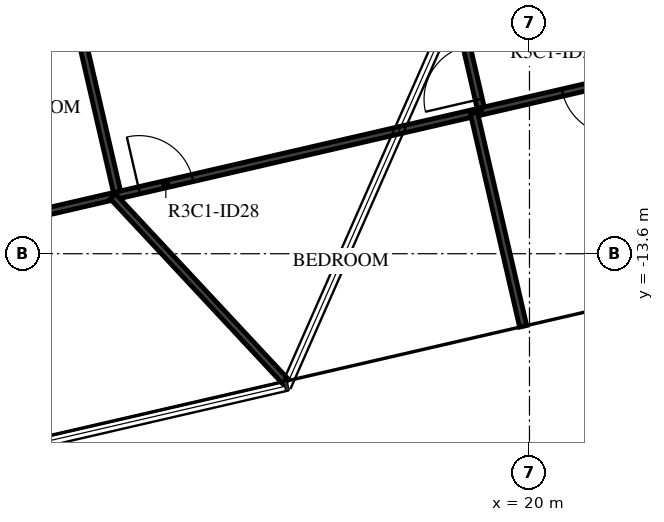
"""IFC4 building model, lengths in metres.
Left out: names, types, materials, properties, quantities, classifications, styles, units other than length and angle.
Written with IfcOpenShell. Run it as: python <this file> out.ifc"""

import sys

from ifc_helpers import new_model, si_unit, direction, frame, frame_2d, origin, place, context, subcontext, project, spatial, rectangle, extrude, element, fill, save


model = new_model("IFC4")
c1 = context("Model", 3, precision=1e-05, world=origin(), true_north=direction((0.0, 1.0)))
c2 = subcontext(c1, "Body", "Model", "MODEL_VIEW")
j1 = project(units=[si_unit("LENGTHUNIT", "METRE"), si_unit("PLANEANGLEUNIT", "RADIAN")], contexts=[c1])
p1 = place(None, origin())
s1 = spatial("IfcSite", under=j1, at=p1, CompositionType="ELEMENT")
p2 = place(p1, origin())
s2 = spatial("IfcBuilding", under=s1, at=p2, CompositionType="ELEMENT")
p3 = place(p2, frame((0.0, 0.0, 137.9)))
s3 = spatial("IfcBuildingStorey", under=s2, at=p3, CompositionType="ELEMENT", Elevation=137.9)
p4 = place(p3, frame((7.388, -13.894, 0.0), z_axis=(0.0, 0.0, 1.0), x_axis=(0.731339966659, 0.682013088707, 0.0)))
e1 = element("IfcWall", 1, at=p4, inside=s3, PredefinedType="PARTITIONING", context=c2, shape_type="SweptSolid", body=[
    extrude(rectangle(XDim=6.899, YDim=0.12, at=frame_2d((3.45, 0.0))), origin(), (0.0, 0.0, 1.0), 3.12),
])
p5 = place(p4, frame((1.3, 0.0, 0.0)))
e2 = element("IfcOpeningElement", 2, at=p5, cuts=e1, PredefinedType="OPENING", context=c2, shape_type="SweptSolid", body=[
    extrude(rectangle(XDim=0.8, YDim=2.1, at=frame_2d((0.4, 1.05))), frame((0.0, 0.07, 0.0), z_axis=(0.0, -1.0, 0.0), x_axis=(1.0, 0.0, 0.0)), (0.0, 0.0, 1.0), 0.14),
])
p6 = place(p3, frame((12.434, -9.189, 0.0), z_axis=(0.0, 0.0, 1.0), x_axis=(0.224924972887, -0.974376085796, 0.0)))
e3 = element("IfcWall", 3, at=p6, inside=s3, PredefinedType="PARTITIONING", context=c2, shape_type="SweptSolid", body=[
    extrude(rectangle(XDim=3.541, YDim=0.12, at=frame_2d((1.771, 0.0))), origin(), (0.0, 0.0, 1.0), 3.12),
])
p7 = place(p3, frame((7.249, -14.02, 0.0), z_axis=(0.0, 0.0, 1.0), x_axis=(0.974369514697, 0.224953437023, 0.0)))
e4 = element("IfcWall", 4, at=p7, inside=s3, PredefinedType="PARTITIONING", context=c2, shape_type="SweptSolid", body=[
    extrude(rectangle(XDim=12.149, YDim=0.12, at=frame_2d((6.074, 0.0))), origin(), (0.0, 0.0, 1.0), 3.12),
])
p8 = place(p7, frame((6.498, 0.0, 0.0)))
e5 = element("IfcOpeningElement", 5, at=p8, cuts=e4, PredefinedType="OPENING", context=c2, shape_type="SweptSolid", body=[
    extrude(rectangle(XDim=0.9, YDim=2.1, at=frame_2d((0.45, 1.05))), frame((0.0, 0.07, 0.0), z_axis=(0.0, -1.0, 0.0), x_axis=(1.0, 0.0, 0.0)), (0.0, 0.0, 1.0), 0.14),
])
p9 = place(p3, frame((19.211, -11.258, 0.0), z_axis=(0.0, 0.0, 1.0), x_axis=(-0.22499500936, 0.974359915926, 0.0)))
e6 = element("IfcWall", 6, at=p9, inside=s3, PredefinedType="PARTITIONING", context=c2, shape_type="SweptSolid", body=[
    extrude(rectangle(XDim=5.921, YDim=0.12, at=frame_2d((2.961, 0.0))), origin(), (0.0, 0.0, 1.0), 3.12),
])
p10 = place(p9, frame((0.2, 0.0, 0.0)))
e7 = element("IfcOpeningElement", 7, at=p10, cuts=e6, PredefinedType="OPENING", context=c2, shape_type="SweptSolid", body=[
    extrude(rectangle(XDim=0.9, YDim=2.1, at=frame_2d((0.45, 1.05))), frame((0.0, 0.07, 0.0), z_axis=(0.0, -1.0, 0.0), x_axis=(1.0, 0.0, 0.0)), (0.0, 0.0, 1.0), 0.14),
])
p11 = place(p3, frame((15.985, -15.698, 0.0), z_axis=(0.0, 0.0, 1.0), x_axis=(-0.681979185924, 0.731371581322, 0.0)))
e8 = element("IfcWall", 8, at=p11, inside=s3, PredefinedType="PARTITIONING", context=c2, shape_type="SweptSolid", body=[
    extrude(rectangle(XDim=4.157, YDim=0.12, at=frame_2d((2.079, 0.0))), origin(), (0.0, 0.0, 1.0), 3.12),
])
p12 = place(p3, frame((19.896, -14.794, 0.0), z_axis=(0.0, 0.0, 1.0), x_axis=(-0.224958568294, 0.974368330023, 0.0)))
e9 = element("IfcWall", 9, at=p12, inside=s3, PredefinedType="PARTITIONING", context=c2, shape_type="SweptSolid", body=[
    extrude(rectangle(XDim=3.6, YDim=0.12, at=frame_2d((1.8, 0.0))), origin(), (0.0, 0.0, 1.0), 3.12),
])
p13 = place(p3, frame((21.615, -10.703, 0.0), z_axis=(0.0, 0.0, 1.0), x_axis=(-0.974361171506, -0.224989571893, 0.0)))
e10 = element("IfcWall", 10, at=p13, inside=s3, PredefinedType="PARTITIONING", context=c2, shape_type="SweptSolid", body=[
    extrude(rectangle(XDim=2.468, YDim=0.12, at=frame_2d((1.234, 0.0))), origin(), (0.0, 0.0, 1.0), 3.12),
])
p14 = place(p13, frame((0.2, 0.0, 0.0)))
e11 = element("IfcOpeningElement", 11, at=p14, cuts=e10, PredefinedType="OPENING", context=c2, shape_type="SweptSolid", body=[
    extrude(rectangle(XDim=0.9, YDim=2.1, at=frame_2d((0.45, 1.05))), frame((0.0, 0.07, 0.0), z_axis=(0.0, -1.0, 0.0), x_axis=(1.0, 0.0, 0.0)), (0.0, 0.0, 1.0), 0.14),
])
p15 = place(p8, origin())
e12 = element("IfcDoor", 12, at=p15, inside=s3, OperationType="SINGLE_SWING_RIGHT", PredefinedType="DOOR", context=c2, shape_type="SweptSolid", body=[
    extrude(rectangle(XDim=0.9, YDim=2.1, at=frame_2d((0.45, 1.05))), frame((0.0, 0.025, 0.0), z_axis=(0.0, -1.0, 0.0), x_axis=(1.0, 0.0, 0.0)), (0.0, 0.0, 1.0), 0.05),
])
fill(e5, e12)
p16 = place(p10, origin())
e13 = element("IfcDoor", 13, at=p16, inside=s3, OperationType="SINGLE_SWING_RIGHT", PredefinedType="DOOR", context=c2, shape_type="SweptSolid", body=[
    extrude(rectangle(XDim=0.9, YDim=2.1, at=frame_2d((0.45, 1.05))), frame((0.0, 0.025, 0.0), z_axis=(0.0, -1.0, 0.0), x_axis=(1.0, 0.0, 0.0)), (0.0, 0.0, 1.0), 0.05),
])
fill(e7, e13)
p17 = place(p14, origin())
e14 = element("IfcDoor", 14, at=p17, inside=s3, OperationType="SINGLE_SWING_RIGHT", PredefinedType="DOOR", context=c2, shape_type="SweptSolid", body=[
    extrude(rectangle(XDim=0.9, YDim=2.1, at=frame_2d((0.45, 1.05))), frame((0.0, 0.025, 0.0), z_axis=(0.0, -1.0, 0.0), x_axis=(1.0, 0.0, 0.0)), (0.0, 0.0, 1.0), 0.05),
])
fill(e11, e14)
save(model, sys.argv[1])
